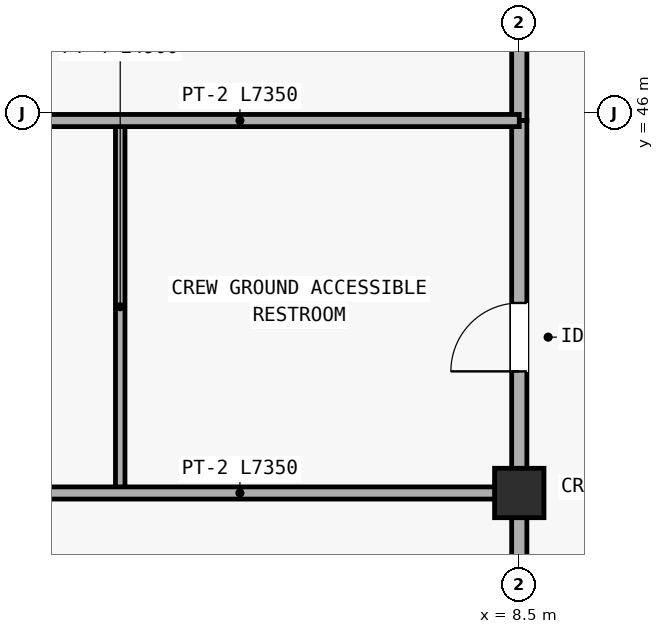
"""IFC4 building model, lengths in metres.
Left out: names, types, materials, properties, quantities, classifications, styles, units other than length and angle.
Written with IfcOpenShell. Run it as: python <this file> out.ifc"""

import sys

from ifc_helpers import new_model, si_unit, direction, frame, frame_2d, origin, origin_2d, place, context, subcontext, project, spatial, rectangle, extrude, element, fill, save


model = new_model("IFC4")
c1 = context("Model", 3, precision=1e-05, world=origin(), true_north=direction((0.0, 1.0)))
c2 = subcontext(c1, "Body", "Model", "MODEL_VIEW")
j1 = project(units=[si_unit("LENGTHUNIT", "METRE"), si_unit("PLANEANGLEUNIT", "RADIAN")], contexts=[c1])
p1 = place(None, origin())
s1 = spatial("IfcSite", under=j1, at=p1, CompositionType="ELEMENT")
p2 = place(p1, origin())
s2 = spatial("IfcBuilding", under=s1, at=p2, CompositionType="ELEMENT")
p3 = place(p2, origin())
s3 = spatial("IfcBuildingStorey", under=s2, at=p3, CompositionType="ELEMENT", Elevation=0.0)
p4 = place(p3, frame((8.5, 41.0, 0.0), z_axis=(0.0, 0.0, 1.0), x_axis=(1.0, 0.0, 0.0)))
e1 = element("IfcColumn", 1, at=p4, inside=s3, PredefinedType="COLUMN", context=c2, shape_type="SweptSolid", body=[
    extrude(rectangle(XDim=0.65, YDim=0.65, at=origin_2d()), origin(), (0.0, 0.0, 1.0), 5.85),
])
p5 = place(p3, frame((8.5, 27.74, 0.0), z_axis=(0.0, 0.0, 1.0), x_axis=(0.0, 1.0, 0.0)))
e2 = element("IfcWall", 2, at=p5, inside=s3, PredefinedType="PARTITIONING", context=c2, shape_type="SweptSolid", body=[
    extrude(rectangle(XDim=13.26, YDim=0.2, at=frame_2d((6.63, 0.0))), origin(), (0.0, 0.0, 1.0), 5.0),
])
p6 = place(p5, frame((3.2, 0.0, 0.0)))
e3 = element("IfcOpeningElement", 3, at=p6, cuts=e2, PredefinedType="OPENING", context=c2, shape_type="SweptSolid", body=[
    extrude(rectangle(XDim=1.02, YDim=2.14, at=frame_2d((0.51, 1.07))), frame((0.0, 0.11, 0.0), z_axis=(0.0, -1.0, 0.0), x_axis=(1.0, 0.0, 0.0)), (0.0, 0.0, 1.0), 0.22),
])
p7 = place(p3, frame((8.5, 41.0, 0.0), z_axis=(0.0, 0.0, 1.0), x_axis=(0.0, 1.0, 0.0)))
e4 = element("IfcWall", 4, at=p7, inside=s3, PredefinedType="PARTITIONING", context=c2, shape_type="SweptSolid", body=[
    extrude(rectangle(XDim=4.9, YDim=0.2, at=frame_2d((2.45, 0.0))), origin(), (0.0, 0.0, 1.0), 5.0),
])
p8 = place(p7, frame((1.6, 0.0, 0.0)))
e5 = element("IfcOpeningElement", 5, at=p8, cuts=e4, PredefinedType="OPENING", context=c2, shape_type="SweptSolid", body=[
    extrude(rectangle(XDim=0.9, YDim=2.08, at=frame_2d((0.45, 1.04))), frame((0.0, 0.11, 0.0), z_axis=(0.0, -1.0, 0.0), x_axis=(1.0, 0.0, 0.0)), (0.0, 0.0, 1.0), 0.22),
])
p9 = place(p3, frame((3.25, 41.0, 0.0), z_axis=(0.0, 0.0, 1.0), x_axis=(0.0, 1.0, 0.0)))
e6 = element("IfcWall", 6, at=p9, inside=s3, PredefinedType="PARTITIONING", context=c2, shape_type="SweptSolid", body=[
    extrude(rectangle(XDim=4.9, YDim=0.125, at=frame_2d((2.45, 0.0))), origin(), (0.0, 0.0, 1.0), 5.0),
])
p10 = place(p3, frame((8.5, 45.9, 0.0), z_axis=(0.0, 0.0, 1.0), x_axis=(0.0, 1.0, 0.0)))
e7 = element("IfcWall", 7, at=p10, inside=s3, PredefinedType="PARTITIONING", context=c2, shape_type="SweptSolid", body=[
    extrude(rectangle(XDim=18.95, YDim=0.2, at=frame_2d((9.475, 0.0))), origin(), (0.0, 0.0, 1.0), 5.0),
])
p11 = place(p10, frame((2.2, 0.0, 0.0)))
e8 = element("IfcOpeningElement", 8, at=p11, cuts=e7, PredefinedType="OPENING", context=c2, shape_type="SweptSolid", body=[
    extrude(rectangle(XDim=1.0, YDim=2.12, at=frame_2d((0.5, 1.06))), frame((0.0, 0.11, 0.0), z_axis=(0.0, -1.0, 0.0), x_axis=(1.0, 0.0, 0.0)), (0.0, 0.0, 1.0), 0.22),
])
for number, where, z_axis, x_axis in (
    (9, (1.15, 41.0, 0.0), (0.0, 0.0, 1.0), (1.0, 0.0, 0.0)),
    (10, (1.15, 45.9, 0.0), (0.0, 0.0, 1.0), (1.0, 0.0, 0.0)),
):
    element("IfcWall", number, at=place(p3, frame(where, z_axis=z_axis, x_axis=x_axis)), inside=s3, PredefinedType="PARTITIONING", context=c2, shape_type="SweptSolid", body=[
        extrude(rectangle(XDim=7.35, YDim=0.16, at=frame_2d((3.675, 0.0))), origin(), (0.0, 0.0, 1.0), 5.0),
    ])
p12 = place(p8, origin())
e11 = element("IfcDoor", 11, at=p12, inside=s3, OperationType="SINGLE_SWING_LEFT", PredefinedType="DOOR", context=c2, shape_type="SweptSolid", body=[
    extrude(rectangle(XDim=0.9, YDim=2.08, at=frame_2d((0.45, 1.04))), frame((0.0, 0.025, 0.0), z_axis=(0.0, -1.0, 0.0), x_axis=(1.0, 0.0, 0.0)), (0.0, 0.0, 1.0), 0.05),
])
fill(e5, e11)
save(model, sys.argv[1])
